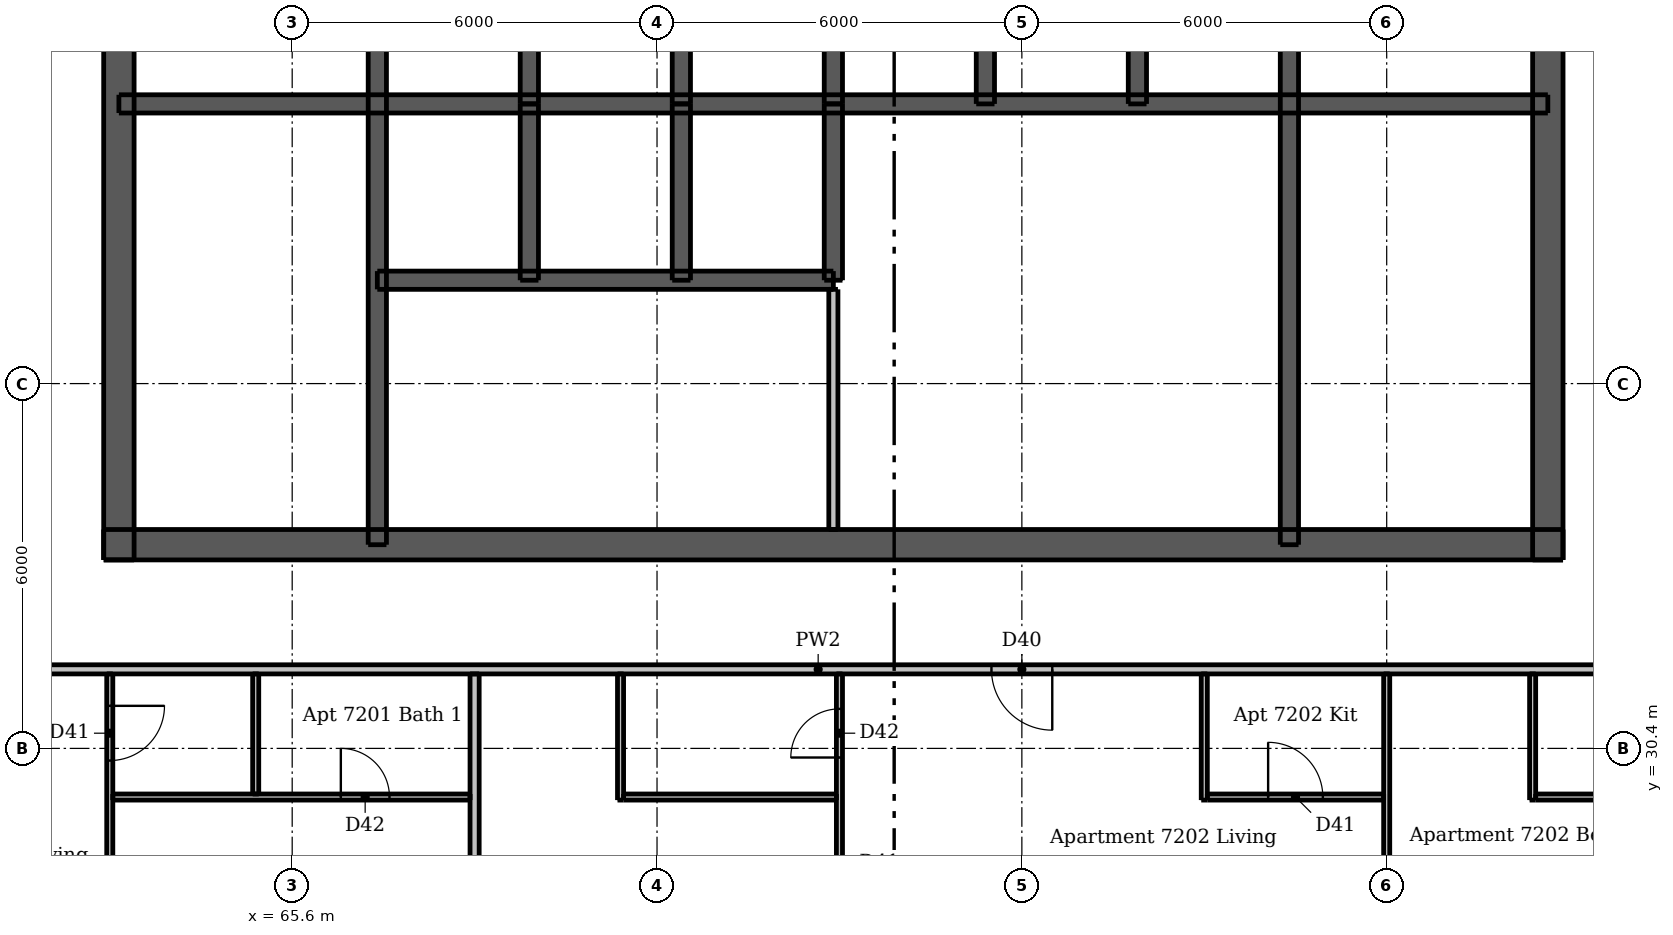
"""IFC4 building model, lengths in metres.
Left out: names, types, materials, properties, quantities, classifications, styles, units other than length and angle.
Written with IfcOpenShell. Run it as: python <this file> out.ifc"""

import sys

from ifc_helpers import new_model, si_unit, direction, frame, frame_2d, origin, place, context, subcontext, project, spatial, rectangle, extrude, element, fill, save


model = new_model("IFC4")
c1 = context("Model", 3, precision=1e-05, world=origin(), true_north=direction((0.0, 1.0)))
c2 = subcontext(c1, "Body", "Model", "MODEL_VIEW")
j1 = project(units=[si_unit("LENGTHUNIT", "METRE"), si_unit("PLANEANGLEUNIT", "RADIAN")], contexts=[c1])
p1 = place(None, origin())
s1 = spatial("IfcSite", under=j1, at=p1, CompositionType="ELEMENT")
p2 = place(p1, origin())
s2 = spatial("IfcBuilding", under=s1, at=p2, CompositionType="ELEMENT")
p3 = place(p2, frame((0.0, 0.0, 268.6)))
s3 = spatial("IfcBuildingStorey", under=s2, at=p3, CompositionType="ELEMENT", Elevation=268.6)
p4 = place(p3, frame((62.5, 33.75, 0.0), z_axis=(0.0, 0.0, 1.0), x_axis=(1.0, 0.0, 0.0)))
e1 = element("IfcWall", 1, at=p4, inside=s3, PredefinedType="SHEAR", context=c2, shape_type="SweptSolid", body=[
    extrude(rectangle(XDim=24.0, YDim=0.5, at=frame_2d((12.0, 0.0))), origin(), (0.0, 0.0, 1.0), 3.05),
])
p5 = place(p4, frame((1.875, 0.0, 0.0)))
e2 = element("IfcOpeningElement", 2, at=p5, cuts=e1, PredefinedType="OPENING", context=c2, shape_type="SweptSolid", body=[
    extrude(rectangle(XDim=1.1, YDim=2.1, at=frame_2d((0.55, 1.05))), frame((0.0, 0.26, 0.0), z_axis=(0.0, -1.0, 0.0), x_axis=(1.0, 0.0, 0.0)), (0.0, 0.0, 1.0), 0.52),
])
p6 = place(p4, frame((21.025, 0.0, 0.0)))
e3 = element("IfcOpeningElement", 3, at=p6, cuts=e1, PredefinedType="OPENING", context=c2, shape_type="SweptSolid", body=[
    extrude(rectangle(XDim=1.1, YDim=2.1, at=frame_2d((0.55, 1.05))), frame((0.0, 0.26, 0.0), z_axis=(0.0, -1.0, 0.0), x_axis=(1.0, 0.0, 0.0)), (0.0, 0.0, 1.0), 0.52),
])
p7 = place(p4, frame((8.0, 0.0, 0.0)))
e4 = element("IfcOpeningElement", 4, at=p7, cuts=e1, PredefinedType="OPENING", context=c2, shape_type="SweptSolid", body=[
    extrude(rectangle(XDim=1.1, YDim=2.1, at=frame_2d((0.55, 1.05))), frame((0.0, 0.26, 0.0), z_axis=(0.0, -1.0, 0.0), x_axis=(1.0, 0.0, 0.0)), (0.0, 0.0, 1.0), 0.52),
])
p8 = place(p4, frame((15.3, 0.0, 0.0)))
e5 = element("IfcOpeningElement", 5, at=p8, cuts=e1, PredefinedType="OPENING", context=c2, shape_type="SweptSolid", body=[
    extrude(rectangle(XDim=0.9, YDim=2.1, at=frame_2d((0.45, 1.05))), frame((0.0, 0.26, 0.0), z_axis=(0.0, -1.0, 0.0), x_axis=(1.0, 0.0, 0.0)), (0.0, 0.0, 1.0), 0.52),
])
p9 = place(p3, frame((62.75, 33.5, 0.0), z_axis=(0.0, 0.0, 1.0), x_axis=(0.0, 1.0, 0.0)))
e6 = element("IfcWall", 6, at=p9, inside=s3, PredefinedType="SHEAR", context=c2, shape_type="SweptSolid", body=[
    extrude(rectangle(XDim=24.0, YDim=0.5, at=frame_2d((12.0, 0.0))), origin(), (0.0, 0.0, 1.0), 3.05),
])
p10 = place(p9, frame((11.2, 0.0, 0.0)))
e7 = element("IfcOpeningElement", 7, at=p10, cuts=e6, PredefinedType="OPENING", context=c2, shape_type="SweptSolid", body=[
    extrude(rectangle(XDim=1.6, YDim=2.1, at=frame_2d((0.8, 1.05))), frame((0.0, 0.26, 0.0), z_axis=(0.0, -1.0, 0.0), x_axis=(1.0, 0.0, 0.0)), (0.0, 0.0, 1.0), 0.52),
])
p11 = place(p3, frame((86.25, 33.5, 0.0), z_axis=(0.0, 0.0, 1.0), x_axis=(0.0, 1.0, 0.0)))
e8 = element("IfcWall", 8, at=p11, inside=s3, PredefinedType="SHEAR", context=c2, shape_type="SweptSolid", body=[
    extrude(rectangle(XDim=24.0, YDim=0.5, at=frame_2d((12.0, 0.0))), origin(), (0.0, 0.0, 1.0), 3.05),
])
p12 = place(p11, frame((11.2, 0.0, 0.0)))
e9 = element("IfcOpeningElement", 9, at=p12, cuts=e8, PredefinedType="OPENING", context=c2, shape_type="SweptSolid", body=[
    extrude(rectangle(XDim=1.6, YDim=2.1, at=frame_2d((0.8, 1.05))), frame((0.0, 0.26, 0.0), z_axis=(0.0, -1.0, 0.0), x_axis=(1.0, 0.0, 0.0)), (0.0, 0.0, 1.0), 0.52),
])
p13 = place(p3, frame((62.75, 41.0, 0.0), z_axis=(0.0, 0.0, 1.0), x_axis=(1.0, 0.0, 0.0)))
e10 = element("IfcWall", 10, at=p13, inside=s3, PredefinedType="SHEAR", context=c2, shape_type="SweptSolid", body=[
    extrude(rectangle(XDim=23.5, YDim=0.3, at=frame_2d((11.75, 0.0))), origin(), (0.0, 0.0, 1.0), 3.05),
])
p14 = place(p3, frame((67.0, 33.75, 0.0), z_axis=(0.0, 0.0, 1.0), x_axis=(0.0, 1.0, 0.0)))
e11 = element("IfcWall", 11, at=p14, inside=s3, PredefinedType="SHEAR", context=c2, shape_type="SweptSolid", body=[
    extrude(rectangle(XDim=10.15, YDim=0.3, at=frame_2d((5.075, 0.0))), origin(), (0.0, 0.0, 1.0), 3.05),
])
p15 = place(p14, frame((0.45, 0.0, 0.0)))
e12 = element("IfcOpeningElement", 12, at=p15, cuts=e11, PredefinedType="OPENING", context=c2, shape_type="SweptSolid", body=[
    extrude(rectangle(XDim=1.1, YDim=2.1, at=frame_2d((0.55, 1.05))), frame((0.0, 0.16, 0.0), z_axis=(0.0, -1.0, 0.0), x_axis=(1.0, 0.0, 0.0)), (0.0, 0.0, 1.0), 0.32),
])
p16 = place(p3, frame((82.0, 33.75, 0.0), z_axis=(0.0, 0.0, 1.0), x_axis=(0.0, 1.0, 0.0)))
e13 = element("IfcWall", 13, at=p16, inside=s3, PredefinedType="SHEAR", context=c2, shape_type="SweptSolid", body=[
    extrude(rectangle(XDim=10.15, YDim=0.3, at=frame_2d((5.075, 0.0))), origin(), (0.0, 0.0, 1.0), 3.05),
])
for number, where, z_axis, x_axis in (
    (14, (69.5, 41.0, 0.0), (0.0, 0.0, 1.0), (0.0, 1.0, 0.0)),
    (15, (72.0, 41.0, 0.0), (0.0, 0.0, 1.0), (0.0, 1.0, 0.0)),
    (16, (74.5, 41.0, 0.0), (0.0, 0.0, 1.0), (0.0, 1.0, 0.0)),
    (17, (77.0, 41.0, 0.0), (0.0, 0.0, 1.0), (0.0, 1.0, 0.0)),
    (18, (79.5, 41.0, 0.0), (0.0, 0.0, 1.0), (0.0, 1.0, 0.0)),
):
    element("IfcWall", number, at=place(p3, frame(where, z_axis=z_axis, x_axis=x_axis)), inside=s3, PredefinedType="SHEAR", context=c2, shape_type="SweptSolid", body=[
        extrude(rectangle(XDim=2.9, YDim=0.3, at=frame_2d((1.45, 0.0))), origin(), (0.0, 0.0, 1.0), 3.05),
    ])
p17 = place(p3, frame((67.0, 38.1, 0.0), z_axis=(0.0, 0.0, 1.0), x_axis=(1.0, 0.0, 0.0)))
e19 = element("IfcWall", 19, at=p17, inside=s3, PredefinedType="SHEAR", context=c2, shape_type="SweptSolid", body=[
    extrude(rectangle(XDim=7.5, YDim=0.3, at=frame_2d((3.75, 0.0))), origin(), (0.0, 0.0, 1.0), 3.05),
])
p18 = place(p17, frame((0.7, 0.0, 0.0)))
e20 = element("IfcOpeningElement", 20, at=p18, cuts=e19, PredefinedType="OPENING", context=c2, shape_type="SweptSolid", body=[
    extrude(rectangle(XDim=1.1, YDim=2.1, at=frame_2d((0.55, 1.05))), frame((0.0, 0.16, 0.0), z_axis=(0.0, -1.0, 0.0), x_axis=(1.0, 0.0, 0.0)), (0.0, 0.0, 1.0), 0.32),
])
p19 = place(p17, frame((3.2, 0.0, 0.0)))
e21 = element("IfcOpeningElement", 21, at=p19, cuts=e19, PredefinedType="OPENING", context=c2, shape_type="SweptSolid", body=[
    extrude(rectangle(XDim=1.1, YDim=2.1, at=frame_2d((0.55, 1.05))), frame((0.0, 0.16, 0.0), z_axis=(0.0, -1.0, 0.0), x_axis=(1.0, 0.0, 0.0)), (0.0, 0.0, 1.0), 0.32),
])
p20 = place(p17, frame((5.65, 0.0, 0.0)))
e22 = element("IfcOpeningElement", 22, at=p20, cuts=e19, PredefinedType="OPENING", context=c2, shape_type="SweptSolid", body=[
    extrude(rectangle(XDim=1.2, YDim=2.1, at=frame_2d((0.6, 1.05))), frame((0.0, 0.16, 0.0), z_axis=(0.0, -1.0, 0.0), x_axis=(1.0, 0.0, 0.0)), (0.0, 0.0, 1.0), 0.32),
])
for number, where, z_axis, x_axis in (
    (23, (69.5, 38.1, 0.0), (0.0, 0.0, 1.0), (0.0, 1.0, 0.0)),
    (24, (72.0, 38.1, 0.0), (0.0, 0.0, 1.0), (0.0, 1.0, 0.0)),
    (25, (74.5, 38.1, 0.0), (0.0, 0.0, 1.0), (0.0, 1.0, 0.0)),
):
    element("IfcWall", number, at=place(p3, frame(where, z_axis=z_axis, x_axis=x_axis)), inside=s3, PredefinedType="SHEAR", context=c2, shape_type="SweptSolid", body=[
        extrude(rectangle(XDim=2.9, YDim=0.3, at=frame_2d((1.45, 0.0))), origin(), (0.0, 0.0, 1.0), 3.05),
    ])
p21 = place(p3, frame((74.5, 34.0, 0.0), z_axis=(0.0, 0.0, 1.0), x_axis=(0.0, 1.0, 0.0)))
e26 = element("IfcWall", 26, at=p21, inside=s3, PredefinedType="PLUMBINGWALL", context=c2, shape_type="SweptSolid", body=[
    extrude(rectangle(XDim=3.95, YDim=0.15, at=frame_2d((1.975, 0.0))), origin(), (0.0, 0.0, 1.0), 3.05),
])
p22 = place(p3, frame((62.6, 31.625, 0.0), z_axis=(0.0, 0.0, 1.0), x_axis=(0.0, -1.0, 0.0)))
e27 = element("IfcWall", 27, at=p22, inside=s3, PredefinedType="PARTITIONING", context=c2, shape_type="SweptSolid", body=[
    extrude(rectangle(XDim=5.125, YDim=0.1, at=frame_2d((2.562, 0.0))), origin(), (0.0, 0.0, 1.0), 3.05),
])
p23 = place(p22, frame((0.525, 0.0, 0.0)))
e28 = element("IfcOpeningElement", 28, at=p23, cuts=e27, PredefinedType="OPENING", context=c2, shape_type="SweptSolid", body=[
    extrude(rectangle(XDim=0.9, YDim=2.1, at=frame_2d((0.45, 1.05))), frame((0.0, 0.06, 0.0), z_axis=(0.0, -1.0, 0.0), x_axis=(1.0, 0.0, 0.0)), (0.0, 0.0, 1.0), 0.12),
])
p24 = place(p22, frame((3.125, 0.0, 0.0)))
e29 = element("IfcOpeningElement", 29, at=p24, cuts=e27, PredefinedType="OPENING", context=c2, shape_type="SweptSolid", body=[
    extrude(rectangle(XDim=0.9, YDim=2.1, at=frame_2d((0.45, 1.05))), frame((0.0, 0.06, 0.0), z_axis=(0.0, -1.0, 0.0), x_axis=(1.0, 0.0, 0.0)), (0.0, 0.0, 1.0), 0.12),
])
p25 = place(p3, frame((65.0, 29.65, 0.0), z_axis=(0.0, 0.0, 1.0), x_axis=(0.0, 1.0, 0.0)))
e30 = element("IfcWall", 30, at=p25, inside=s3, PredefinedType="PARTITIONING", context=c2, shape_type="SweptSolid", body=[
    extrude(rectangle(XDim=1.975, YDim=0.1, at=frame_2d((0.988, 0.0))), origin(), (0.0, 0.0, 1.0), 3.05),
])
p26 = place(p3, frame((71.0, 29.55, 0.0), z_axis=(0.0, 0.0, 1.0), x_axis=(0.0, 1.0, 0.0)))
e31 = element("IfcWall", 31, at=p26, inside=s3, PredefinedType="PARTITIONING", context=c2, shape_type="SweptSolid", body=[
    extrude(rectangle(XDim=2.075, YDim=0.1, at=frame_2d((1.038, 0.0))), origin(), (0.0, 0.0, 1.0), 3.05),
])
p27 = place(p3, frame((74.6, 26.5, 0.0), z_axis=(0.0, 0.0, 1.0), x_axis=(0.0, 1.0, 0.0)))
e32 = element("IfcWall", 32, at=p27, inside=s3, PredefinedType="PARTITIONING", context=c2, shape_type="SweptSolid", body=[
    extrude(rectangle(XDim=5.125, YDim=0.1, at=frame_2d((2.562, 0.0))), origin(), (0.0, 0.0, 1.0), 3.05),
])
p28 = place(p27, frame((1.1, 0.0, 0.0)))
e33 = element("IfcOpeningElement", 33, at=p28, cuts=e32, PredefinedType="OPENING", context=c2, shape_type="SweptSolid", body=[
    extrude(rectangle(XDim=0.9, YDim=2.1, at=frame_2d((0.45, 1.05))), frame((0.0, 0.06, 0.0), z_axis=(0.0, -1.0, 0.0), x_axis=(1.0, 0.0, 0.0)), (0.0, 0.0, 1.0), 0.12),
])
p29 = place(p27, frame((3.75, 0.0, 0.0)))
e34 = element("IfcOpeningElement", 34, at=p29, cuts=e32, PredefinedType="OPENING", context=c2, shape_type="SweptSolid", body=[
    extrude(rectangle(XDim=0.8, YDim=2.1, at=frame_2d((0.4, 1.05))), frame((0.0, 0.06, 0.0), z_axis=(0.0, -1.0, 0.0), x_axis=(1.0, 0.0, 0.0)), (0.0, 0.0, 1.0), 0.12),
])
p30 = place(p3, frame((80.6, 29.55, 0.0), z_axis=(0.0, 0.0, 1.0), x_axis=(0.0, 1.0, 0.0)))
e35 = element("IfcWall", 35, at=p30, inside=s3, PredefinedType="PARTITIONING", context=c2, shape_type="SweptSolid", body=[
    extrude(rectangle(XDim=2.075, YDim=0.1, at=frame_2d((1.038, 0.0))), origin(), (0.0, 0.0, 1.0), 3.05),
])
p31 = place(p3, frame((83.6, 31.625, 0.0), z_axis=(0.0, 0.0, 1.0), x_axis=(0.0, -1.0, 0.0)))
e36 = element("IfcWall", 36, at=p31, inside=s3, PredefinedType="PARTITIONING", context=c2, shape_type="SweptSolid", body=[
    extrude(rectangle(XDim=5.125, YDim=0.1, at=frame_2d((2.562, 0.0))), origin(), (0.0, 0.0, 1.0), 2.647),
])
p32 = place(p31, frame((3.125, 0.0, 0.0)))
e37 = element("IfcOpeningElement", 37, at=p32, cuts=e36, PredefinedType="OPENING", context=c2, shape_type="SweptSolid", body=[
    extrude(rectangle(XDim=0.9, YDim=2.1, at=frame_2d((0.45, 1.05))), frame((0.0, 0.06, 0.0), z_axis=(0.0, -1.0, 0.0), x_axis=(1.0, 0.0, 0.0)), (0.0, 0.0, 1.0), 0.12),
])
p33 = place(p3, frame((86.0, 29.55, 0.0), z_axis=(0.0, 0.0, 1.0), x_axis=(0.0, 1.0, 0.0)))
e38 = element("IfcWall", 38, at=p33, inside=s3, PredefinedType="PARTITIONING", context=c2, shape_type="SweptSolid", body=[
    extrude(rectangle(XDim=2.075, YDim=0.1, at=frame_2d((1.038, 0.0))), origin(), (0.0, 0.0, 1.0), 3.05),
])
p34 = place(p3, frame((62.65, 29.6, 0.0), z_axis=(0.0, 0.0, 1.0), x_axis=(1.0, 0.0, 0.0)))
e39 = element("IfcWall", 39, at=p34, inside=s3, PredefinedType="PARTITIONING", context=c2, shape_type="SweptSolid", body=[
    extrude(rectangle(XDim=5.875, YDim=0.1, at=frame_2d((2.938, 0.0))), origin(), (0.0, 0.0, 1.0), 3.05),
])
p35 = place(p34, frame((3.75, 0.0, 0.0)))
e40 = element("IfcOpeningElement", 40, at=p35, cuts=e39, PredefinedType="OPENING", context=c2, shape_type="SweptSolid", body=[
    extrude(rectangle(XDim=0.8, YDim=2.1, at=frame_2d((0.4, 1.05))), frame((0.0, 0.06, 0.0), z_axis=(0.0, -1.0, 0.0), x_axis=(1.0, 0.0, 0.0)), (0.0, 0.0, 1.0), 0.12),
])
p36 = place(p3, frame((71.05, 29.6, 0.0), z_axis=(0.0, 0.0, 1.0), x_axis=(1.0, 0.0, 0.0)))
e41 = element("IfcWall", 41, at=p36, inside=s3, PredefinedType="PARTITIONING", context=c2, shape_type="SweptSolid", body=[
    extrude(rectangle(XDim=3.5, YDim=0.1, at=frame_2d((1.75, 0.0))), origin(), (0.0, 0.0, 1.0), 3.05),
])
p37 = place(p3, frame((80.65, 29.6, 0.0), z_axis=(0.0, 0.0, 1.0), x_axis=(1.0, 0.0, 0.0)))
e42 = element("IfcWall", 42, at=p37, inside=s3, PredefinedType="PARTITIONING", context=c2, shape_type="SweptSolid", body=[
    extrude(rectangle(XDim=2.9, YDim=0.1, at=frame_2d((1.45, 0.0))), origin(), (0.0, 0.0, 1.0), 3.05),
])
p38 = place(p37, frame((1.0, 0.0, 0.0)))
e43 = element("IfcOpeningElement", 43, at=p38, cuts=e42, PredefinedType="OPENING", context=c2, shape_type="SweptSolid", body=[
    extrude(rectangle(XDim=0.9, YDim=2.1, at=frame_2d((0.45, 1.05))), frame((0.0, 0.06, 0.0), z_axis=(0.0, -1.0, 0.0), x_axis=(1.0, 0.0, 0.0)), (0.0, 0.0, 1.0), 0.12),
])
p39 = place(p3, frame((86.05, 29.6, 0.0), z_axis=(0.0, 0.0, 1.0), x_axis=(1.0, 0.0, 0.0)))
e44 = element("IfcWall", 44, at=p39, inside=s3, PredefinedType="PARTITIONING", context=c2, shape_type="SweptSolid", body=[
    extrude(rectangle(XDim=2.75, YDim=0.1, at=frame_2d((1.375, 0.0))), origin(), (0.0, 0.0, 1.0), 3.05),
])
p40 = place(p39, frame((1.05, 0.0, 0.0)))
e45 = element("IfcOpeningElement", 45, at=p40, cuts=e44, PredefinedType="OPENING", context=c2, shape_type="SweptSolid", body=[
    extrude(rectangle(XDim=0.8, YDim=2.1, at=frame_2d((0.4, 1.05))), frame((0.0, 0.06, 0.0), z_axis=(0.0, -1.0, 0.0), x_axis=(1.0, 0.0, 0.0)), (0.0, 0.0, 1.0), 0.12),
])
p41 = place(p3, frame((68.6, 26.5, 0.0), z_axis=(0.0, 0.0, 1.0), x_axis=(0.0, 1.0, 0.0)))
e46 = element("IfcWall", 46, at=p41, inside=s3, PredefinedType="PARTITIONING", context=c2, shape_type="SweptSolid", body=[
    extrude(rectangle(XDim=5.125, YDim=0.15, at=frame_2d((2.562, 0.0))), origin(), (0.0, 0.0, 1.0), 3.05),
])
p42 = place(p3, frame((89.525, 31.7, 0.0), z_axis=(0.0, 0.0, 1.0), x_axis=(-1.0, 0.0, 0.0)))
e47 = element("IfcWall", 47, at=p42, inside=s3, PredefinedType="PARTITIONING", context=c2, shape_type="SweptSolid", body=[
    extrude(rectangle(XDim=30.55, YDim=0.15, at=frame_2d((15.275, 0.0))), origin(), (0.0, 0.0, 1.0), 3.05),
])
p43 = place(p42, frame((28.275, 0.0, 0.0)))
e48 = element("IfcOpeningElement", 48, at=p43, cuts=e47, PredefinedType="OPENING", context=c2, shape_type="SweptSolid", body=[
    extrude(rectangle(XDim=1.0, YDim=2.1, at=frame_2d((0.5, 1.05))), frame((0.0, 0.085, 0.0), z_axis=(0.0, -1.0, 0.0), x_axis=(1.0, 0.0, 0.0)), (0.0, 0.0, 1.0), 0.17),
])
p44 = place(p42, frame((11.425, 0.0, 0.0)))
e49 = element("IfcOpeningElement", 49, at=p44, cuts=e47, PredefinedType="OPENING", context=c2, shape_type="SweptSolid", body=[
    extrude(rectangle(XDim=1.0, YDim=2.1, at=frame_2d((0.5, 1.05))), frame((0.0, 0.085, 0.0), z_axis=(0.0, -1.0, 0.0), x_axis=(1.0, 0.0, 0.0)), (0.0, 0.0, 1.0), 0.17),
])
p45 = place(p5, origin())
e50 = element("IfcDoor", 50, at=p45, inside=s3, OperationType="SINGLE_SWING_LEFT", PredefinedType="DOOR", context=c2, shape_type="SweptSolid", body=[
    extrude(rectangle(XDim=1.1, YDim=2.1, at=frame_2d((0.55, 1.05))), frame((0.0, 0.237, 0.0), z_axis=(0.0, -1.0, 0.0), x_axis=(1.0, 0.0, 0.0)), (0.0, 0.0, 1.0), 0.05),
])
fill(e2, e50)
p46 = place(p6, origin())
e51 = element("IfcDoor", 51, at=p46, inside=s3, OperationType="SINGLE_SWING_RIGHT", PredefinedType="DOOR", context=c2, shape_type="SweptSolid", body=[
    extrude(rectangle(XDim=1.1, YDim=2.1, at=frame_2d((0.55, 1.05))), frame((0.0, 0.237, 0.0), z_axis=(0.0, -1.0, 0.0), x_axis=(1.0, 0.0, 0.0)), (0.0, 0.0, 1.0), 0.05),
])
fill(e3, e51)
p47 = place(p7, origin())
e52 = element("IfcDoor", 52, at=p47, inside=s3, OperationType="SINGLE_SWING_LEFT", PredefinedType="DOOR", context=c2, shape_type="SweptSolid", body=[
    extrude(rectangle(XDim=1.1, YDim=2.1, at=frame_2d((0.55, 1.05))), frame((0.0, 0.237, 0.0), z_axis=(0.0, -1.0, 0.0), x_axis=(1.0, 0.0, 0.0)), (0.0, 0.0, 1.0), 0.05),
])
fill(e4, e52)
p48 = place(p15, origin())
e53 = element("IfcDoor", 53, at=p48, inside=s3, OperationType="SINGLE_SWING_RIGHT", PredefinedType="DOOR", context=c2, shape_type="SweptSolid", body=[
    extrude(rectangle(XDim=1.1, YDim=2.1, at=frame_2d((0.55, 1.05))), frame((0.0, -0.087, 0.0), z_axis=(0.0, -1.0, 0.0), x_axis=(1.0, 0.0, 0.0)), (0.0, 0.0, 1.0), 0.05),
])
fill(e12, e53)
p49 = place(p8, origin())
e54 = element("IfcDoor", 54, at=p49, inside=s3, OperationType="SINGLE_SWING_LEFT", PredefinedType="DOOR", context=c2, shape_type="SweptSolid", body=[
    extrude(rectangle(XDim=0.9, YDim=2.1, at=frame_2d((0.45, 1.05))), frame((0.0, 0.237, 0.0), z_axis=(0.0, -1.0, 0.0), x_axis=(1.0, 0.0, 0.0)), (0.0, 0.0, 1.0), 0.05),
])
fill(e5, e54)
p50 = place(p18, origin())
e55 = element("IfcDoor", 55, at=p50, inside=s3, OperationType="DOUBLE_DOOR_SLIDING", PredefinedType="DOOR", context=c2, shape_type="SweptSolid", body=[
    extrude(rectangle(XDim=1.1, YDim=2.1, at=frame_2d((0.55, 1.05))), frame((0.0, 0.025, 0.0), z_axis=(0.0, -1.0, 0.0), x_axis=(1.0, 0.0, 0.0)), (0.0, 0.0, 1.0), 0.05),
])
fill(e20, e55)
p51 = place(p19, origin())
e56 = element("IfcDoor", 56, at=p51, inside=s3, OperationType="DOUBLE_DOOR_SLIDING", PredefinedType="DOOR", context=c2, shape_type="SweptSolid", body=[
    extrude(rectangle(XDim=1.1, YDim=2.1, at=frame_2d((0.55, 1.05))), frame((0.0, 0.025, 0.0), z_axis=(0.0, -1.0, 0.0), x_axis=(1.0, 0.0, 0.0)), (0.0, 0.0, 1.0), 0.05),
])
fill(e21, e56)
p52 = place(p20, origin())
e57 = element("IfcDoor", 57, at=p52, inside=s3, OperationType="DOUBLE_DOOR_SLIDING", PredefinedType="DOOR", context=c2, shape_type="SweptSolid", body=[
    extrude(rectangle(XDim=1.2, YDim=2.1, at=frame_2d((0.6, 1.05))), frame((0.0, 0.025, 0.0), z_axis=(0.0, -1.0, 0.0), x_axis=(1.0, 0.0, 0.0)), (0.0, 0.0, 1.0), 0.05),
])
fill(e22, e57)
p53 = place(p23, origin())
e58 = element("IfcDoor", 58, at=p53, inside=s3, OperationType="SINGLE_SWING_LEFT", PredefinedType="DOOR", context=c2, shape_type="SweptSolid", body=[
    extrude(rectangle(XDim=0.9, YDim=2.1, at=frame_2d((0.45, 1.05))), frame((0.0, 0.025, 0.0), z_axis=(0.0, -1.0, 0.0), x_axis=(1.0, 0.0, 0.0)), (0.0, 0.0, 1.0), 0.05),
])
fill(e28, e58)
p54 = place(p35, origin())
e59 = element("IfcDoor", 59, at=p54, inside=s3, OperationType="SINGLE_SWING_LEFT", PredefinedType="DOOR", context=c2, shape_type="SweptSolid", body=[
    extrude(rectangle(XDim=0.8, YDim=2.1, at=frame_2d((0.4, 1.05))), frame((0.0, 0.025, 0.0), z_axis=(0.0, -1.0, 0.0), x_axis=(1.0, 0.0, 0.0)), (0.0, 0.0, 1.0), 0.05),
])
fill(e40, e59)
p55 = place(p44, origin())
e60 = element("IfcDoor", 60, at=p55, inside=s3, OperationType="SINGLE_SWING_LEFT", PredefinedType="DOOR", context=c2, shape_type="SweptSolid", body=[
    extrude(rectangle(XDim=1.0, YDim=2.1, at=frame_2d((0.5, 1.05))), frame((0.0, 0.025, 0.0), z_axis=(0.0, -1.0, 0.0), x_axis=(1.0, 0.0, 0.0)), (0.0, 0.0, 1.0), 0.05),
])
fill(e49, e60)
p56 = place(p38, origin())
e61 = element("IfcDoor", 61, at=p56, inside=s3, OperationType="SINGLE_SWING_LEFT", PredefinedType="DOOR", context=c2, shape_type="SweptSolid", body=[
    extrude(rectangle(XDim=0.9, YDim=2.1, at=frame_2d((0.45, 1.05))), frame((0.0, 0.025, 0.0), z_axis=(0.0, -1.0, 0.0), x_axis=(1.0, 0.0, 0.0)), (0.0, 0.0, 1.0), 0.05),
])
fill(e43, e61)
p57 = place(p29, origin())
e62 = element("IfcDoor", 62, at=p57, inside=s3, OperationType="SINGLE_SWING_LEFT", PredefinedType="DOOR", context=c2, shape_type="SweptSolid", body=[
    extrude(rectangle(XDim=0.8, YDim=2.1, at=frame_2d((0.4, 1.05))), frame((0.0, 0.025, 0.0), z_axis=(0.0, -1.0, 0.0), x_axis=(1.0, 0.0, 0.0)), (0.0, 0.0, 1.0), 0.05),
])
fill(e34, e62)
save(model, sys.argv[1])
